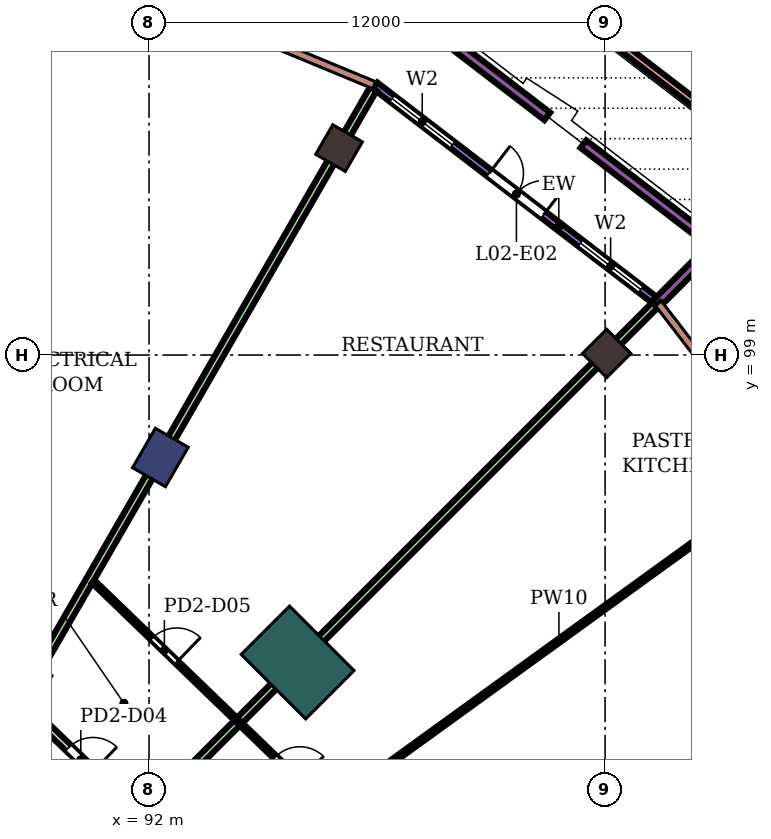
"""IFC4 building model, lengths in metres.
Left out: names, types, materials, properties, quantities, classifications, styles, units other than length and angle.
Written with IfcOpenShell. Run it as: python <this file> out.ifc"""

import sys

from ifc_helpers import new_model, si_unit, direction, frame, frame_2d, origin, origin_2d, place, context, subcontext, project, spatial, rectangle, extrude, element, fill, save


model = new_model("IFC4")
c1 = context("Model", 3, precision=1e-05, world=origin(), true_north=direction((0.0, 1.0)))
c2 = subcontext(c1, "Body", "Model", "MODEL_VIEW")
j1 = project(units=[si_unit("LENGTHUNIT", "METRE"), si_unit("PLANEANGLEUNIT", "RADIAN")], contexts=[c1])
p1 = place(None, origin())
s1 = spatial("IfcSite", under=j1, at=p1, CompositionType="ELEMENT")
p2 = place(p1, origin())
s2 = spatial("IfcBuilding", under=s1, at=p2, CompositionType="ELEMENT")
p3 = place(p2, frame((0.0, 0.0, 12.4)))
s3 = spatial("IfcBuildingStorey", under=s2, at=p3, CompositionType="ELEMENT", Elevation=12.4)
for number, where, z_axis, x_axis in (
    (1, (104.042, 99.042, 0.0), (0.0, 0.0, 1.0), (0.707, 0.707, 0.0)),
    (2, (97.0, 104.445, 0.0), (0.0, 0.0, 1.0), (0.5, 0.866, 0.0)),
):
    element("IfcColumn", number, at=place(p3, frame(where, z_axis=z_axis, x_axis=x_axis)), inside=s3, PredefinedType="COLUMN", context=c2, shape_type="SweptSolid", body=[
        extrude(rectangle(XDim=0.9, YDim=0.9, at=origin_2d()), origin(), (0.0, 0.0, 1.0), 5.4),
    ])
p4 = place(p3, frame((92.3, 96.304, 0.0), z_axis=(0.0, 0.0, 1.0), x_axis=(0.5, 0.866025403784, 0.0)))
e3 = element("IfcColumn", 3, at=p4, inside=s3, PredefinedType="COLUMN", context=c2, shape_type="SweptSolid", body=[
    extrude(rectangle(XDim=1.2, YDim=1.0, at=origin_2d()), origin(), (0.0, 0.0, 1.0), 5.4),
])
p5 = place(p3, frame((95.91, 90.91, 0.0), z_axis=(0.0, 0.0, 1.0), x_axis=(0.707106781187, 0.707106781187, 0.0)))
e4 = element("IfcColumn", 4, at=p5, inside=s3, PredefinedType="COLUMN", context=c2, shape_type="SweptSolid", body=[
    extrude(rectangle(XDim=1.8, YDim=2.4, at=origin_2d()), origin(), (0.0, 0.0, 1.0), 5.4),
])
p6 = place(p3, frame((105.385, 100.385, 0.0), z_axis=(0.0, 0.0, 1.0), x_axis=(-0.793355555811, 0.608758541676, 0.0)))
e5 = element("IfcWall", 5, at=p6, inside=s3, PredefinedType="NOTDEFINED", context=c2, shape_type="SweptSolid", body=[
    extrude(rectangle(XDim=9.372, YDim=0.2, at=frame_2d((4.686, 0.0))), origin(), (0.0, 0.0, 1.0), 5.4),
])
p7 = place(p6, frame((0.562, 0.0, 0.9)))
e6 = element("IfcOpeningElement", 6, at=p7, cuts=e5, PredefinedType="OPENING", context=c2, shape_type="SweptSolid", body=[
    extrude(rectangle(XDim=2.0, YDim=2.4, at=frame_2d((1.0, 1.2))), frame((0.0, 0.11, 0.0), z_axis=(0.0, -1.0, 0.0), x_axis=(1.0, 0.0, 0.0)), (0.0, 0.0, 1.0), 0.22),
])
p8 = place(p6, frame((3.786, 0.0, 0.0)))
e7 = element("IfcOpeningElement", 7, at=p8, cuts=e5, PredefinedType="OPENING", context=c2, shape_type="SweptSolid", body=[
    extrude(rectangle(XDim=1.8, YDim=2.4, at=frame_2d((0.9, 1.2))), frame((0.0, 0.11, 0.0), z_axis=(0.0, -1.0, 0.0), x_axis=(1.0, 0.0, 0.0)), (0.0, 0.0, 1.0), 0.22),
])
p9 = place(p6, frame((6.81, 0.0, 0.9)))
e8 = element("IfcOpeningElement", 8, at=p9, cuts=e5, PredefinedType="OPENING", context=c2, shape_type="SweptSolid", body=[
    extrude(rectangle(XDim=2.0, YDim=2.4, at=frame_2d((1.0, 1.2))), frame((0.0, 0.11, 0.0), z_axis=(0.0, -1.0, 0.0), x_axis=(1.0, 0.0, 0.0)), (0.0, 0.0, 1.0), 0.22),
])
p10 = place(p3, frame((100.359, 110.237, 0.0), z_axis=(0.0, 0.0, 1.0), x_axis=(0.793353052568, -0.608761803977, 0.0)))
e9 = element("IfcWall", 9, at=p10, inside=s3, PredefinedType="PARAPET", context=c2, shape_type="SweptSolid", body=[
    extrude(rectangle(XDim=10.598, YDim=0.2, at=frame_2d((5.299, 0.0))), origin(), (0.0, 0.0, 1.0), 1.1),
])
p11 = place(p3, frame((99.029, 107.927, 0.0), z_axis=(0.0, 0.0, 1.0), x_axis=(0.793347799177, -0.608768650261, 0.0)))
e10 = element("IfcWall", 10, at=p11, inside=s3, PredefinedType="USERDEFINED", context=c2, shape_type="SweptSolid", body=[
    extrude(rectangle(XDim=4.348, YDim=0.25, at=frame_2d((2.174, 0.0))), origin(), (0.0, 0.0, 1.0), 0.6),
])
p12 = place(p3, frame((103.431, 104.55, 0.0), z_axis=(0.0, 0.0, 1.0), x_axis=(0.793330761393, -0.608790853272, 0.0)))
e11 = element("IfcWall", 11, at=p12, inside=s3, PredefinedType="USERDEFINED", context=c2, shape_type="SweptSolid", body=[
    extrude(rectangle(XDim=4.222, YDim=0.25, at=frame_2d((2.111, 0.0))), origin(), (0.0, 0.0, 1.0), 0.6),
])
p13 = place(p3, frame((106.792, 101.792, 0.0), z_axis=(0.0, 0.0, 1.0), x_axis=(-0.707106781187, -0.707106781187, 0.0)))
e12 = element("IfcWall", 12, at=p13, inside=s3, PredefinedType="USERDEFINED", context=c2, shape_type="SweptSolid", body=[
    extrude(rectangle(XDim=2.092, YDim=0.25, at=frame_2d((1.046, 0.0))), origin(), (0.0, 0.0, 1.0), 0.6),
])
p14 = place(p3, frame((88.668, 89.832, 0.0), z_axis=(0.0, 0.0, 1.0), x_axis=(0.71956091863, -0.694429322811, 0.0)))
e13 = element("IfcWall", 13, at=p14, inside=s3, PredefinedType="PARTITIONING", context=c2, shape_type="SweptSolid", body=[
    extrude(rectangle(XDim=7.043, YDim=0.2, at=frame_2d((3.521, 0.0))), origin(), (0.0, 0.0, 1.0), 4.95),
])
p15 = place(p14, frame((5.271, 0.0, 0.0)))
e14 = element("IfcOpeningElement", 14, at=p15, cuts=e13, PredefinedType="OPENING", context=c2, shape_type="SweptSolid", body=[
    extrude(rectangle(XDim=0.9, YDim=2.1, at=frame_2d((0.45, 1.05))), frame((0.0, 0.11, 0.0), z_axis=(0.0, -1.0, 0.0), x_axis=(1.0, 0.0, 0.0)), (0.0, 0.0, 1.0), 0.22),
])
p16 = place(p14, frame((1.684, 0.0, 0.0)))
e15 = element("IfcOpeningElement", 15, at=p16, cuts=e13, PredefinedType="OPENING", context=c2, shape_type="SweptSolid", body=[
    extrude(rectangle(XDim=0.9, YDim=2.1, at=frame_2d((0.45, 1.05))), frame((0.0, 0.11, 0.0), z_axis=(0.0, -1.0, 0.0), x_axis=(1.0, 0.0, 0.0)), (0.0, 0.0, 1.0), 0.22),
])
p17 = place(p3, frame((88.602, 89.897, 0.0), z_axis=(0.0, 0.0, 1.0), x_axis=(0.50004595028, 0.865998872752, 0.0)))
e16 = element("IfcWall", 16, at=p17, inside=s3, PredefinedType="PARTITIONING", context=c2, shape_type="SweptSolid", body=[
    extrude(rectangle(XDim=18.596, YDim=0.2, at=frame_2d((9.298, 0.0))), origin(), (0.0, 0.0, 1.0), 3.75),
])
p18 = place(p3, frame((91.876, 86.876, 0.0), z_axis=(0.0, 0.0, 1.0), x_axis=(0.707106781187, 0.707106781187, 0.0)))
e17 = element("IfcWall", 17, at=p18, inside=s3, PredefinedType="PARTITIONING", context=c2, shape_type="SweptSolid", body=[
    extrude(rectangle(XDim=19.004, YDim=0.2, at=frame_2d((9.502, 0.0))), origin(), (0.0, 0.0, 1.0), 3.75),
])
p19 = place(p3, frame((90.536, 93.034, 0.0), z_axis=(0.0, 0.0, 1.0), x_axis=(0.719550314706, -0.694440310327, 0.0)))
e18 = element("IfcWall", 18, at=p19, inside=s3, PredefinedType="PARTITIONING", context=c2, shape_type="SweptSolid", body=[
    extrude(rectangle(XDim=13.875, YDim=0.1, at=frame_2d((6.937, 0.0))), origin(), (0.0, 0.0, 1.0), 4.95),
])
p20 = place(p19, frame((10.763, 0.0, 0.0)))
e19 = element("IfcOpeningElement", 19, at=p20, cuts=e18, PredefinedType="OPENING", context=c2, shape_type="SweptSolid", body=[
    extrude(rectangle(XDim=0.9, YDim=2.1, at=frame_2d((0.45, 1.05))), frame((0.0, 0.06, 0.0), z_axis=(0.0, -1.0, 0.0), x_axis=(1.0, 0.0, 0.0)), (0.0, 0.0, 1.0), 0.12),
])
p21 = place(p19, frame((6.648, 0.0, 0.0)))
e20 = element("IfcOpeningElement", 20, at=p21, cuts=e18, PredefinedType="OPENING", context=c2, shape_type="SweptSolid", body=[
    extrude(rectangle(XDim=0.9, YDim=2.1, at=frame_2d((0.45, 1.05))), frame((0.0, 0.06, 0.0), z_axis=(0.0, -1.0, 0.0), x_axis=(1.0, 0.0, 0.0)), (0.0, 0.0, 1.0), 0.12),
])
p22 = place(p19, frame((2.146, 0.0, 0.0)))
e21 = element("IfcOpeningElement", 21, at=p22, cuts=e18, PredefinedType="OPENING", context=c2, shape_type="SweptSolid", body=[
    extrude(rectangle(XDim=0.9, YDim=2.1, at=frame_2d((0.45, 1.05))), frame((0.0, 0.06, 0.0), z_axis=(0.0, -1.0, 0.0), x_axis=(1.0, 0.0, 0.0)), (0.0, 0.0, 1.0), 0.12),
])
p23 = place(p3, frame((96.752, 87.118, 0.0), z_axis=(0.0, 0.0, 1.0), x_axis=(0.810241473642, 0.586096198921, 0.0)))
e22 = element("IfcWall", 22, at=p23, inside=s3, PredefinedType="PARTITIONING", context=c2, shape_type="SweptSolid", body=[
    extrude(rectangle(XDim=14.891, YDim=0.1, at=frame_2d((7.445, 0.0))), origin(), (0.0, 0.0, 1.0), 4.95),
])
p24 = place(p7, origin())
e23 = element("IfcWindow", 23, at=p24, inside=s3, PartitioningType="SINGLE_PANEL", PredefinedType="WINDOW", context=c2, shape_type="SweptSolid", body=[
    extrude(rectangle(XDim=2.0, YDim=2.4, at=frame_2d((1.0, 1.2))), frame((0.0, 0.03, 0.0), z_axis=(0.0, -1.0, 0.0), x_axis=(1.0, 0.0, 0.0)), (0.0, 0.0, 1.0), 0.06),
])
fill(e6, e23)
p25 = place(p8, frame((1.8, 0.0, 0.0), z_axis=(0.0, 0.0, 1.0), x_axis=(-1.0, 0.0, 0.0)))
e24 = element("IfcDoor", 24, at=p25, inside=s3, OperationType="DOUBLE_DOOR_SINGLE_SWING", PredefinedType="DOOR", context=c2, shape_type="SweptSolid", body=[
    extrude(rectangle(XDim=1.8, YDim=2.4, at=frame_2d((0.9, 1.2))), frame((0.0, 0.025, 0.0), z_axis=(0.0, -1.0, 0.0), x_axis=(1.0, 0.0, 0.0)), (0.0, 0.0, 1.0), 0.05),
])
fill(e7, e24)
p26 = place(p9, origin())
e25 = element("IfcWindow", 25, at=p26, inside=s3, PartitioningType="SINGLE_PANEL", PredefinedType="WINDOW", context=c2, shape_type="SweptSolid", body=[
    extrude(rectangle(XDim=2.0, YDim=2.4, at=frame_2d((1.0, 1.2))), frame((0.0, 0.03, 0.0), z_axis=(0.0, -1.0, 0.0), x_axis=(1.0, 0.0, 0.0)), (0.0, 0.0, 1.0), 0.06),
])
fill(e8, e25)
p27 = place(p21, origin())
e26 = element("IfcDoor", 26, at=p27, inside=s3, OperationType="SINGLE_SWING_RIGHT", PredefinedType="DOOR", context=c2, shape_type="SweptSolid", body=[
    extrude(rectangle(XDim=0.9, YDim=2.1, at=frame_2d((0.45, 1.05))), frame((0.0, 0.025, 0.0), z_axis=(0.0, -1.0, 0.0), x_axis=(1.0, 0.0, 0.0)), (0.0, 0.0, 1.0), 0.05),
])
fill(e20, e26)
p28 = place(p16, origin())
e27 = element("IfcDoor", 27, at=p28, inside=s3, OperationType="SINGLE_SWING_RIGHT", PredefinedType="DOOR", context=c2, shape_type="SweptSolid", body=[
    extrude(rectangle(XDim=0.9, YDim=2.1, at=frame_2d((0.45, 1.05))), frame((0.0, 0.025, 0.0), z_axis=(0.0, -1.0, 0.0), x_axis=(1.0, 0.0, 0.0)), (0.0, 0.0, 1.0), 0.05),
])
fill(e15, e27)
p29 = place(p22, origin())
e28 = element("IfcDoor", 28, at=p29, inside=s3, OperationType="SINGLE_SWING_RIGHT", PredefinedType="DOOR", context=c2, shape_type="SweptSolid", body=[
    extrude(rectangle(XDim=0.9, YDim=2.1, at=frame_2d((0.45, 1.05))), frame((0.0, 0.025, 0.0), z_axis=(0.0, -1.0, 0.0), x_axis=(1.0, 0.0, 0.0)), (0.0, 0.0, 1.0), 0.05),
])
fill(e21, e28)
save(model, sys.argv[1])
